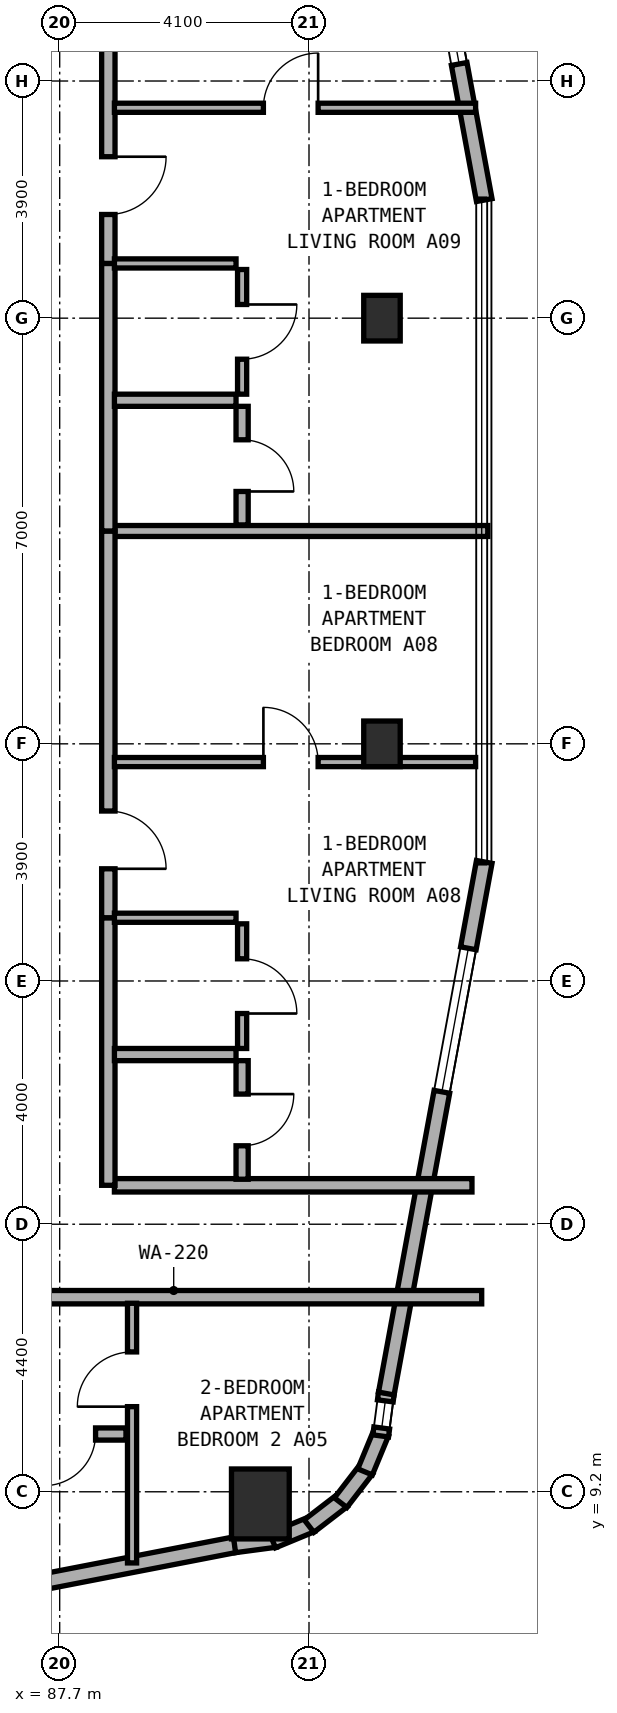
"""IFC4 building model, lengths in metres.
Left out: names, types, materials, properties, quantities, classifications, styles, units other than length and angle.
Written with IfcOpenShell. Run it as: python <this file> out.ifc"""

import sys

from ifc_helpers import new_model, si_unit, direction, frame, frame_2d, origin, origin_2d, place, context, subcontext, project, spatial, rectangle, extrude, element, fill, save


model = new_model("IFC4")
c1 = context("Model", 3, precision=1e-05, world=origin(), true_north=direction((0.0, 1.0)))
c2 = subcontext(c1, "Body", "Model", "MODEL_VIEW")
j1 = project(units=[si_unit("LENGTHUNIT", "METRE"), si_unit("PLANEANGLEUNIT", "RADIAN")], contexts=[c1])
p1 = place(None, origin())
s1 = spatial("IfcSite", under=j1, at=p1, CompositionType="ELEMENT")
p2 = place(p1, origin())
s2 = spatial("IfcBuilding", under=s1, at=p2, CompositionType="ELEMENT")
p3 = place(p2, frame((0.0, 0.0, 98.5)))
s3 = spatial("IfcBuildingStorey", under=s2, at=p3, CompositionType="ELEMENT", Elevation=98.5)
for number, where, z_axis, x_axis in (
    (1, (93.0, 21.5, 0.0), (0.0, 0.0, 1.0), (1.0, 0.0, 0.0)),
    (2, (93.0, 28.5, 0.0), (0.0, 0.0, 1.0), (1.0, 0.0, 0.0)),
):
    element("IfcColumn", number, at=place(p3, frame(where, z_axis=z_axis, x_axis=x_axis)), inside=s3, PredefinedType="COLUMN", context=c2, shape_type="SweptSolid", body=[
        extrude(rectangle(XDim=0.6, YDim=0.75, at=origin_2d()), origin(), (0.0, 0.0, 1.0), 3.5),
    ])
p4 = place(p3, frame((91.0, 9.0, 0.0), z_axis=(0.0, 0.0, 1.0), x_axis=(1.0, 0.0, 0.0)))
e3 = element("IfcColumn", 3, at=p4, inside=s3, PredefinedType="COLUMN", context=c2, shape_type="SweptSolid", body=[
    extrude(rectangle(XDim=0.95, YDim=1.15, at=origin_2d()), origin(), (0.0, 0.0, 1.0), 3.5),
])
p5 = place(p3, frame((82.261, 6.718, 0.0), z_axis=(0.0, 0.0, 1.0), x_axis=(0.981750199588, 0.190175039396, 0.0)))
e4 = element("IfcWall", 4, at=p5, inside=s3, PredefinedType="STANDARD", context=c2, shape_type="SweptSolid", body=[
    extrude(rectangle(XDim=8.477, YDim=0.26, at=frame_2d((4.238, 0.0))), origin(), (0.0, 0.0, 1.0), 3.25),
])
p6 = place(p5, frame((2.139, 0.0, 0.8)))
e5 = element("IfcOpeningElement", 5, at=p6, cuts=e4, PredefinedType="OPENING", context=c2, shape_type="SweptSolid", body=[
    extrude(rectangle(XDim=2.4, YDim=1.6, at=frame_2d((1.2, 0.8))), frame((0.0, 0.14, 0.0), z_axis=(0.0, -1.0, 0.0), x_axis=(1.0, 0.0, 0.0)), (0.0, 0.0, 1.0), 0.28),
])
p7 = place(p3, frame((90.575, 8.328, 0.0), z_axis=(0.0, 0.0, 1.0), x_axis=(0.991300187529, 0.13162043232, 0.0)))
e6 = element("IfcWall", 6, at=p7, inside=s3, PredefinedType="STANDARD", context=c2, shape_type="SweptSolid", body=[
    extrude(rectangle(XDim=0.677, YDim=0.26, at=frame_2d((0.338, 0.0))), origin(), (0.0, 0.0, 1.0), 3.25),
])
for number, where, z_axis, x_axis in (
    (7, (91.2, 8.399, 0.0), (0.0, 0.0, 1.0), (0.924, 0.382, 0.0)),
    (8, (91.801, 8.636, 0.0), (0.0, 0.0, 1.0), (0.793, 0.61, 0.0)),
    (9, (92.32, 9.021, 0.0), (0.0, 0.0, 1.0), (0.609, 0.793, 0.0)),
):
    element("IfcWall", number, at=place(p3, frame(where, z_axis=z_axis, x_axis=x_axis)), inside=s3, PredefinedType="STANDARD", context=c2, shape_type="SweptSolid", body=[
        extrude(rectangle(XDim=0.694, YDim=0.26, at=frame_2d((0.347, 0.0))), origin(), (0.0, 0.0, 1.0), 3.25),
    ])
p8 = place(p3, frame((92.722, 9.527, 0.0), z_axis=(0.0, 0.0, 1.0), x_axis=(0.382289608286, 0.924042561464, 0.0)))
e10 = element("IfcWall", 10, at=p8, inside=s3, PredefinedType="STANDARD", context=c2, shape_type="SweptSolid", body=[
    extrude(rectangle(XDim=0.694, YDim=0.26, at=frame_2d((0.347, 0.0))), origin(), (0.0, 0.0, 1.0), 3.25),
])
p9 = place(p3, frame((92.979, 10.119, 0.0), z_axis=(0.0, 0.0, 1.0), x_axis=(0.130614135366, 0.991433279471, 0.0)))
e11 = element("IfcWall", 11, at=p9, inside=s3, PredefinedType="STANDARD", context=c2, shape_type="SweptSolid", body=[
    extrude(rectangle(XDim=0.712, YDim=0.26, at=frame_2d((0.356, 0.0))), origin(), (0.0, 0.0, 1.0), 3.25),
])
p10 = place(p9, frame((0.131, 0.0, 0.85)))
e12 = element("IfcOpeningElement", 12, at=p10, cuts=e11, PredefinedType="OPENING", context=c2, shape_type="SweptSolid", body=[
    extrude(rectangle(XDim=0.45, YDim=1.5, at=frame_2d((0.225, 0.75))), frame((0.0, 0.14, 0.0), z_axis=(0.0, -1.0, 0.0), x_axis=(1.0, 0.0, 0.0)), (0.0, 0.0, 1.0), 0.28),
])
p11 = place(p3, frame((93.071, 10.816, 0.0), z_axis=(0.0, 0.0, 1.0), x_axis=(0.181209963057, 0.983444431215, 0.0)))
e13 = element("IfcWall", 13, at=p11, inside=s3, PredefinedType="STANDARD", context=c2, shape_type="SweptSolid", body=[
    extrude(rectangle(XDim=8.889, YDim=0.26, at=frame_2d((4.445, 0.0))), origin(), (0.0, 0.0, 1.0), 3.25),
])
p12 = place(p11, frame((5.045, 0.0, 0.8)))
e14 = element("IfcOpeningElement", 14, at=p12, cuts=e13, PredefinedType="OPENING", context=c2, shape_type="SweptSolid", body=[
    extrude(rectangle(XDim=2.4, YDim=1.6, at=frame_2d((1.2, 0.8))), frame((0.0, 0.14, 0.0), z_axis=(0.0, -1.0, 0.0), x_axis=(1.0, 0.0, 0.0)), (0.0, 0.0, 1.0), 0.28),
])
p13 = place(p3, frame((94.682, 30.442, 0.0), z_axis=(0.0, 0.0, 1.0), x_axis=(-0.181209963057, 0.983444431215, 0.0)))
e15 = element("IfcWall", 15, at=p13, inside=s3, PredefinedType="STANDARD", context=c2, shape_type="SweptSolid", body=[
    extrude(rectangle(XDim=8.889, YDim=0.26, at=frame_2d((4.445, 0.0))), origin(), (0.0, 0.0, 1.0), 3.25),
])
p14 = place(p13, frame((2.276, 0.0, 0.8)))
e16 = element("IfcOpeningElement", 16, at=p14, cuts=e15, PredefinedType="OPENING", context=c2, shape_type="SweptSolid", body=[
    extrude(rectangle(XDim=2.4, YDim=1.6, at=frame_2d((1.2, 0.8))), frame((0.0, 0.14, 0.0), z_axis=(0.0, -1.0, 0.0), x_axis=(1.0, 0.0, 0.0)), (0.0, 0.0, 1.0), 0.28),
])
p15 = place(p3, frame((84.51, 12.4, 0.0), z_axis=(0.0, 0.0, 1.0), x_axis=(1.0, 0.0, 0.0)))
e17 = element("IfcWall", 17, at=p15, inside=s3, PredefinedType="SOLIDWALL", context=c2, shape_type="SweptSolid", body=[
    extrude(rectangle(XDim=10.13, YDim=0.22, at=frame_2d((5.065, 0.0))), origin(), (0.0, 0.0, 1.0), 2.945),
])
p16 = place(p3, frame((88.89, 8.03, 0.0), z_axis=(0.0, 0.0, 1.0), x_axis=(0.0, 1.0, 0.0)))
e18 = element("IfcWall", 18, at=p16, inside=s3, PredefinedType="PARTITIONING", context=c2, shape_type="SweptSolid", body=[
    extrude(rectangle(XDim=4.27, YDim=0.15, at=frame_2d((2.135, 0.0))), origin(), (0.0, 0.0, 1.0), 2.945),
])
p17 = place(p16, frame((2.57, 0.0, 0.0)))
e19 = element("IfcOpeningElement", 19, at=p17, cuts=e18, PredefinedType="OPENING", context=c2, shape_type="SweptSolid", body=[
    extrude(rectangle(XDim=0.9, YDim=2.1, at=frame_2d((0.45, 1.05))), frame((0.0, 0.085, 0.0), z_axis=(0.0, -1.0, 0.0), x_axis=(1.0, 0.0, 0.0)), (0.0, 0.0, 1.0), 0.17),
])
p18 = place(p3, frame((86.94, 10.15, 0.0), z_axis=(0.0, 0.0, 1.0), x_axis=(1.0, 0.0, 0.0)))
e20 = element("IfcWall", 20, at=p18, inside=s3, PredefinedType="PLUMBINGWALL", context=c2, shape_type="SweptSolid", body=[
    extrude(rectangle(XDim=1.85, YDim=0.2, at=frame_2d((0.925, 0.0))), origin(), (0.0, 0.0, 1.0), 3.22),
])
p19 = place(p18, frame((0.5, 0.0, 0.0)))
e21 = element("IfcOpeningElement", 21, at=p19, cuts=e20, PredefinedType="OPENING", context=c2, shape_type="SweptSolid", body=[
    extrude(rectangle(XDim=0.85, YDim=2.1, at=frame_2d((0.425, 1.05))), frame((0.0, 0.11, 0.0), z_axis=(0.0, -1.0, 0.0), x_axis=(1.0, 0.0, 0.0)), (0.0, 0.0, 1.0), 0.22),
])
p20 = place(p3, frame((88.6, 14.24, 0.0), z_axis=(0.0, 0.0, 1.0), x_axis=(1.0, 0.0, 0.0)))
e22 = element("IfcWall", 22, at=p20, inside=s3, PredefinedType="SOLIDWALL", context=c2, shape_type="SweptSolid", body=[
    extrude(rectangle(XDim=5.88, YDim=0.22, at=frame_2d((2.94, 0.0))), origin(), (0.0, 0.0, 1.0), 2.945),
])
p21 = place(p3, frame((88.5, 25.0, 0.0), z_axis=(0.0, 0.0, 1.0), x_axis=(1.0, 0.0, 0.0)))
e23 = element("IfcWall", 23, at=p21, inside=s3, PredefinedType="SOLIDWALL", context=c2, shape_type="SweptSolid", body=[
    extrude(rectangle(XDim=6.24, YDim=0.18, at=frame_2d((3.12, 0.0))), origin(), (0.0, 0.0, 1.0), 2.945),
])
p22 = place(p3, frame((88.5, 14.24, 0.0), z_axis=(0.0, 0.0, 1.0), x_axis=(0.0, 1.0, 0.0)))
e24 = element("IfcWall", 24, at=p22, inside=s3, PredefinedType="SOLIDWALL", context=c2, shape_type="SweptSolid", body=[
    extrude(rectangle(XDim=4.4, YDim=0.22, at=frame_2d((2.2, 0.0))), origin(), (0.0, 0.0, 1.0), 3.22),
])
p23 = place(p3, frame((88.5, 18.64, 0.0), z_axis=(0.0, 0.0, 1.0), x_axis=(0.0, 1.0, 0.0)))
e25 = element("IfcWall", 25, at=p23, inside=s3, PredefinedType="SOLIDWALL", context=c2, shape_type="SweptSolid", body=[
    extrude(rectangle(XDim=6.36, YDim=0.22, at=frame_2d((3.18, 0.0))), origin(), (0.0, 0.0, 1.0), 2.825),
])
p24 = place(p23, frame((0.805, 0.0, 0.0)))
e26 = element("IfcOpeningElement", 26, at=p24, cuts=e25, PredefinedType="OPENING", context=c2, shape_type="SweptSolid", body=[
    extrude(rectangle(XDim=0.95, YDim=2.1, at=frame_2d((0.475, 1.05))), frame((0.0, 0.12, 0.0), z_axis=(0.0, -1.0, 0.0), x_axis=(1.0, 0.0, 0.0)), (0.0, 0.0, 1.0), 0.24),
])
p25 = place(p3, frame((88.6, 21.2, 0.0), z_axis=(0.0, 0.0, 1.0), x_axis=(1.0, 0.0, 0.0)))
e27 = element("IfcWall", 27, at=p25, inside=s3, PredefinedType="PARTITIONING", context=c2, shape_type="SweptSolid", body=[
    extrude(rectangle(XDim=5.94, YDim=0.15, at=frame_2d((2.97, 0.0))), origin(), (0.0, 0.0, 1.0), 2.945),
])
p26 = place(p25, frame((2.45, 0.0, 0.0)))
e28 = element("IfcOpeningElement", 28, at=p26, cuts=e27, PredefinedType="OPENING", context=c2, shape_type="SweptSolid", body=[
    extrude(rectangle(XDim=0.9, YDim=2.1, at=frame_2d((0.45, 1.05))), frame((0.0, 0.085, 0.0), z_axis=(0.0, -1.0, 0.0), x_axis=(1.0, 0.0, 0.0)), (0.0, 0.0, 1.0), 0.17),
])
p27 = place(p3, frame((88.6, 16.39, 0.0), z_axis=(0.0, 0.0, 1.0), x_axis=(1.0, 0.0, 0.0)))
e29 = element("IfcWall", 29, at=p27, inside=s3, PredefinedType="PLUMBINGWALL", context=c2, shape_type="SweptSolid", body=[
    extrude(rectangle(XDim=2.0, YDim=0.2, at=frame_2d((1.0, 0.0))), origin(), (0.0, 0.0, 1.0), 3.22),
])
p28 = place(p3, frame((88.6, 18.64, 0.0), z_axis=(0.0, 0.0, 1.0), x_axis=(1.0, 0.0, 0.0)))
e30 = element("IfcWall", 30, at=p28, inside=s3, PredefinedType="PARTITIONING", context=c2, shape_type="SweptSolid", body=[
    extrude(rectangle(XDim=2.0, YDim=0.15, at=frame_2d((1.0, 0.0))), origin(), (0.0, 0.0, 1.0), 3.22),
])
p29 = place(p3, frame((90.7, 14.34, 0.0), z_axis=(0.0, 0.0, 1.0), x_axis=(0.0, 1.0, 0.0)))
e31 = element("IfcWall", 31, at=p29, inside=s3, PredefinedType="PLUMBINGWALL", context=c2, shape_type="SweptSolid", body=[
    extrude(rectangle(XDim=1.95, YDim=0.2, at=frame_2d((0.975, 0.0))), origin(), (0.0, 0.0, 1.0), 3.22),
])
p30 = place(p29, frame((0.55, 0.0, 0.0)))
e32 = element("IfcOpeningElement", 32, at=p30, cuts=e31, PredefinedType="OPENING", context=c2, shape_type="SweptSolid", body=[
    extrude(rectangle(XDim=0.85, YDim=2.1, at=frame_2d((0.425, 1.05))), frame((0.0, 0.11, 0.0), z_axis=(0.0, -1.0, 0.0), x_axis=(1.0, 0.0, 0.0)), (0.0, 0.0, 1.0), 0.22),
])
p31 = place(p3, frame((90.7, 16.49, 0.0), z_axis=(0.0, 0.0, 1.0), x_axis=(0.0, 1.0, 0.0)))
e33 = element("IfcWall", 33, at=p31, inside=s3, PredefinedType="PARTITIONING", context=c2, shape_type="SweptSolid", body=[
    extrude(rectangle(XDim=2.05, YDim=0.15, at=frame_2d((1.025, 0.0))), origin(), (0.0, 0.0, 1.0), 3.22),
])
p32 = place(p31, frame((0.575, 0.0, 0.0)))
e34 = element("IfcOpeningElement", 34, at=p32, cuts=e33, PredefinedType="OPENING", context=c2, shape_type="SweptSolid", body=[
    extrude(rectangle(XDim=0.9, YDim=2.1, at=frame_2d((0.45, 1.05))), frame((0.0, 0.085, 0.0), z_axis=(0.0, -1.0, 0.0), x_axis=(1.0, 0.0, 0.0)), (0.0, 0.0, 1.0), 0.17),
])
p33 = place(p3, frame((88.5, 25.0, 0.0), z_axis=(0.0, 0.0, 1.0), x_axis=(0.0, 1.0, 0.0)))
e35 = element("IfcWall", 35, at=p33, inside=s3, PredefinedType="SOLIDWALL", context=c2, shape_type="SweptSolid", body=[
    extrude(rectangle(XDim=4.4, YDim=0.22, at=frame_2d((2.2, 0.0))), origin(), (0.0, 0.0, 1.0), 2.825),
])
p34 = place(p3, frame((88.5, 29.4, 0.0), z_axis=(0.0, 0.0, 1.0), x_axis=(0.0, 1.0, 0.0)))
e36 = element("IfcWall", 36, at=p34, inside=s3, PredefinedType="SOLIDWALL", context=c2, shape_type="SweptSolid", body=[
    extrude(rectangle(XDim=6.36, YDim=0.22, at=frame_2d((3.18, 0.0))), origin(), (0.0, 0.0, 1.0), 3.22),
])
p35 = place(p34, frame((0.805, 0.0, 0.0)))
e37 = element("IfcOpeningElement", 37, at=p35, cuts=e36, PredefinedType="OPENING", context=c2, shape_type="SweptSolid", body=[
    extrude(rectangle(XDim=0.95, YDim=2.1, at=frame_2d((0.475, 1.05))), frame((0.0, 0.12, 0.0), z_axis=(0.0, -1.0, 0.0), x_axis=(1.0, 0.0, 0.0)), (0.0, 0.0, 1.0), 0.24),
])
p36 = place(p3, frame((88.6, 31.96, 0.0), z_axis=(0.0, 0.0, 1.0), x_axis=(1.0, 0.0, 0.0)))
e38 = element("IfcWall", 38, at=p36, inside=s3, PredefinedType="PARTITIONING", context=c2, shape_type="SweptSolid", body=[
    extrude(rectangle(XDim=5.94, YDim=0.15, at=frame_2d((2.97, 0.0))), origin(), (0.0, 0.0, 1.0), 2.945),
])
p37 = place(p36, frame((2.45, 0.0, 0.0)))
e39 = element("IfcOpeningElement", 39, at=p37, cuts=e38, PredefinedType="OPENING", context=c2, shape_type="SweptSolid", body=[
    extrude(rectangle(XDim=0.9, YDim=2.1, at=frame_2d((0.45, 1.05))), frame((0.0, 0.085, 0.0), z_axis=(0.0, -1.0, 0.0), x_axis=(1.0, 0.0, 0.0)), (0.0, 0.0, 1.0), 0.17),
])
p38 = place(p3, frame((88.6, 27.15, 0.0), z_axis=(0.0, 0.0, 1.0), x_axis=(1.0, 0.0, 0.0)))
e40 = element("IfcWall", 40, at=p38, inside=s3, PredefinedType="PLUMBINGWALL", context=c2, shape_type="SweptSolid", body=[
    extrude(rectangle(XDim=2.0, YDim=0.2, at=frame_2d((1.0, 0.0))), origin(), (0.0, 0.0, 1.0), 3.22),
])
p39 = place(p3, frame((88.6, 29.4, 0.0), z_axis=(0.0, 0.0, 1.0), x_axis=(1.0, 0.0, 0.0)))
e41 = element("IfcWall", 41, at=p39, inside=s3, PredefinedType="PARTITIONING", context=c2, shape_type="SweptSolid", body=[
    extrude(rectangle(XDim=2.0, YDim=0.15, at=frame_2d((1.0, 0.0))), origin(), (0.0, 0.0, 1.0), 3.22),
])
p40 = place(p3, frame((90.7, 25.1, 0.0), z_axis=(0.0, 0.0, 1.0), x_axis=(0.0, 1.0, 0.0)))
e42 = element("IfcWall", 42, at=p40, inside=s3, PredefinedType="PLUMBINGWALL", context=c2, shape_type="SweptSolid", body=[
    extrude(rectangle(XDim=1.95, YDim=0.2, at=frame_2d((0.975, 0.0))), origin(), (0.0, 0.0, 1.0), 3.22),
])
p41 = place(p40, frame((0.55, 0.0, 0.0)))
e43 = element("IfcOpeningElement", 43, at=p41, cuts=e42, PredefinedType="OPENING", context=c2, shape_type="SweptSolid", body=[
    extrude(rectangle(XDim=0.85, YDim=2.1, at=frame_2d((0.425, 1.05))), frame((0.0, 0.11, 0.0), z_axis=(0.0, -1.0, 0.0), x_axis=(1.0, 0.0, 0.0)), (0.0, 0.0, 1.0), 0.22),
])
p42 = place(p3, frame((90.7, 27.25, 0.0), z_axis=(0.0, 0.0, 1.0), x_axis=(0.0, 1.0, 0.0)))
e44 = element("IfcWall", 44, at=p42, inside=s3, PredefinedType="PARTITIONING", context=c2, shape_type="SweptSolid", body=[
    extrude(rectangle(XDim=2.05, YDim=0.15, at=frame_2d((1.025, 0.0))), origin(), (0.0, 0.0, 1.0), 2.825),
])
p43 = place(p42, frame((0.575, 0.0, 0.0)))
e45 = element("IfcOpeningElement", 45, at=p43, cuts=e44, PredefinedType="OPENING", context=c2, shape_type="SweptSolid", body=[
    extrude(rectangle(XDim=0.9, YDim=2.1, at=frame_2d((0.45, 1.05))), frame((0.0, 0.085, 0.0), z_axis=(0.0, -1.0, 0.0), x_axis=(1.0, 0.0, 0.0)), (0.0, 0.0, 1.0), 0.17),
])
p44 = place(p12, origin())
e46 = element("IfcWindow", 46, at=p44, inside=s3, PartitioningType="SINGLE_PANEL", PredefinedType="WINDOW", context=c2, shape_type="SweptSolid", body=[
    extrude(rectangle(XDim=2.4, YDim=1.6, at=frame_2d((1.2, 0.8))), frame((0.0, 0.03, 0.0), z_axis=(0.0, -1.0, 0.0), x_axis=(1.0, 0.0, 0.0)), (0.0, 0.0, 1.0), 0.06),
])
fill(e14, e46)
p45 = place(p14, origin())
e47 = element("IfcWindow", 47, at=p45, inside=s3, PartitioningType="SINGLE_PANEL", PredefinedType="WINDOW", context=c2, shape_type="SweptSolid", body=[
    extrude(rectangle(XDim=2.4, YDim=1.6, at=frame_2d((1.2, 0.8))), frame((0.0, 0.03, 0.0), z_axis=(0.0, -1.0, 0.0), x_axis=(1.0, 0.0, 0.0)), (0.0, 0.0, 1.0), 0.06),
])
fill(e16, e47)
p46 = place(p10, origin())
e48 = element("IfcWindow", 48, at=p46, inside=s3, PartitioningType="SINGLE_PANEL", PredefinedType="WINDOW", context=c2, shape_type="SweptSolid", body=[
    extrude(rectangle(XDim=0.45, YDim=1.5, at=frame_2d((0.225, 0.75))), frame((0.0, 0.03, 0.0), z_axis=(0.0, -1.0, 0.0), x_axis=(1.0, 0.0, 0.0)), (0.0, 0.0, 1.0), 0.06),
])
fill(e12, e48)
p47 = place(p17, origin())
e49 = element("IfcDoor", 49, at=p47, inside=s3, OperationType="SINGLE_SWING_LEFT", PredefinedType="DOOR", context=c2, shape_type="SweptSolid", body=[
    extrude(rectangle(XDim=0.9, YDim=2.1, at=frame_2d((0.45, 1.05))), frame((0.0, 0.025, 0.0), z_axis=(0.0, -1.0, 0.0), x_axis=(1.0, 0.0, 0.0)), (0.0, 0.0, 1.0), 0.05),
])
fill(e19, e49)
p48 = place(p19, frame((0.85, 0.0, 0.0), z_axis=(0.0, 0.0, 1.0), x_axis=(-1.0, 0.0, 0.0)))
e50 = element("IfcDoor", 50, at=p48, inside=s3, OperationType="SINGLE_SWING_RIGHT", PredefinedType="DOOR", context=c2, shape_type="SweptSolid", body=[
    extrude(rectangle(XDim=0.85, YDim=2.1, at=frame_2d((0.425, 1.05))), frame((0.0, 0.025, 0.0), z_axis=(0.0, -1.0, 0.0), x_axis=(1.0, 0.0, 0.0)), (0.0, 0.0, 1.0), 0.05),
])
fill(e21, e50)
p49 = place(p24, frame((0.95, 0.0, 0.0), z_axis=(0.0, 0.0, 1.0), x_axis=(-1.0, 0.0, 0.0)))
e51 = element("IfcDoor", 51, at=p49, inside=s3, OperationType="SINGLE_SWING_RIGHT", PredefinedType="DOOR", context=c2, shape_type="SweptSolid", body=[
    extrude(rectangle(XDim=0.95, YDim=2.1, at=frame_2d((0.475, 1.05))), frame((0.0, 0.025, 0.0), z_axis=(0.0, -1.0, 0.0), x_axis=(1.0, 0.0, 0.0)), (0.0, 0.0, 1.0), 0.05),
])
fill(e26, e51)
p50 = place(p26, origin())
e52 = element("IfcDoor", 52, at=p50, inside=s3, OperationType="SINGLE_SWING_LEFT", PredefinedType="DOOR", context=c2, shape_type="SweptSolid", body=[
    extrude(rectangle(XDim=0.9, YDim=2.1, at=frame_2d((0.45, 1.05))), frame((0.0, 0.025, 0.0), z_axis=(0.0, -1.0, 0.0), x_axis=(1.0, 0.0, 0.0)), (0.0, 0.0, 1.0), 0.05),
])
fill(e28, e52)
p51 = place(p30, frame((0.85, 0.0, 0.0), z_axis=(0.0, 0.0, 1.0), x_axis=(-1.0, 0.0, 0.0)))
e53 = element("IfcDoor", 53, at=p51, inside=s3, OperationType="SINGLE_SWING_LEFT", PredefinedType="DOOR", context=c2, shape_type="SweptSolid", body=[
    extrude(rectangle(XDim=0.85, YDim=2.1, at=frame_2d((0.425, 1.05))), frame((0.0, 0.025, 0.0), z_axis=(0.0, -1.0, 0.0), x_axis=(1.0, 0.0, 0.0)), (0.0, 0.0, 1.0), 0.05),
])
fill(e32, e53)
p52 = place(p32, frame((0.9, 0.0, 0.0), z_axis=(0.0, 0.0, 1.0), x_axis=(-1.0, 0.0, 0.0)))
e54 = element("IfcDoor", 54, at=p52, inside=s3, OperationType="SINGLE_SWING_RIGHT", PredefinedType="DOOR", context=c2, shape_type="SweptSolid", body=[
    extrude(rectangle(XDim=0.9, YDim=2.1, at=frame_2d((0.45, 1.05))), frame((0.0, 0.025, 0.0), z_axis=(0.0, -1.0, 0.0), x_axis=(1.0, 0.0, 0.0)), (0.0, 0.0, 1.0), 0.05),
])
fill(e34, e54)
p53 = place(p35, frame((0.95, 0.0, 0.0), z_axis=(0.0, 0.0, 1.0), x_axis=(-1.0, 0.0, 0.0)))
e55 = element("IfcDoor", 55, at=p53, inside=s3, OperationType="SINGLE_SWING_LEFT", PredefinedType="DOOR", context=c2, shape_type="SweptSolid", body=[
    extrude(rectangle(XDim=0.95, YDim=2.1, at=frame_2d((0.475, 1.05))), frame((0.0, 0.025, 0.0), z_axis=(0.0, -1.0, 0.0), x_axis=(1.0, 0.0, 0.0)), (0.0, 0.0, 1.0), 0.05),
])
fill(e37, e55)
p54 = place(p37, origin())
e56 = element("IfcDoor", 56, at=p54, inside=s3, OperationType="SINGLE_SWING_RIGHT", PredefinedType="DOOR", context=c2, shape_type="SweptSolid", body=[
    extrude(rectangle(XDim=0.9, YDim=2.1, at=frame_2d((0.45, 1.05))), frame((0.0, 0.025, 0.0), z_axis=(0.0, -1.0, 0.0), x_axis=(1.0, 0.0, 0.0)), (0.0, 0.0, 1.0), 0.05),
])
fill(e39, e56)
p55 = place(p41, frame((0.85, 0.0, 0.0), z_axis=(0.0, 0.0, 1.0), x_axis=(-1.0, 0.0, 0.0)))
e57 = element("IfcDoor", 57, at=p55, inside=s3, OperationType="SINGLE_SWING_RIGHT", PredefinedType="DOOR", context=c2, shape_type="SweptSolid", body=[
    extrude(rectangle(XDim=0.85, YDim=2.1, at=frame_2d((0.425, 1.05))), frame((0.0, 0.025, 0.0), z_axis=(0.0, -1.0, 0.0), x_axis=(1.0, 0.0, 0.0)), (0.0, 0.0, 1.0), 0.05),
])
fill(e43, e57)
p56 = place(p43, frame((0.9, 0.0, 0.0), z_axis=(0.0, 0.0, 1.0), x_axis=(-1.0, 0.0, 0.0)))
e58 = element("IfcDoor", 58, at=p56, inside=s3, OperationType="SINGLE_SWING_LEFT", PredefinedType="DOOR", context=c2, shape_type="SweptSolid", body=[
    extrude(rectangle(XDim=0.9, YDim=2.1, at=frame_2d((0.45, 1.05))), frame((0.0, 0.025, 0.0), z_axis=(0.0, -1.0, 0.0), x_axis=(1.0, 0.0, 0.0)), (0.0, 0.0, 1.0), 0.05),
])
fill(e45, e58)
save(model, sys.argv[1])
